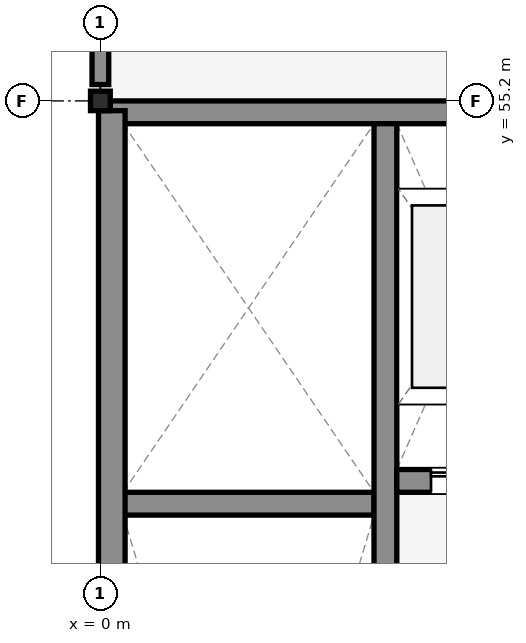
"""IFC4 building model, lengths in metres.
Left out: names, types, materials, properties, quantities, classifications, styles, units other than length and angle.
Written with IfcOpenShell. Run it as: python <this file> out.ifc"""

import sys

from ifc_helpers import new_model, si_unit, direction, frame, frame_2d, origin, origin_2d, place, context, subcontext, project, spatial, rectangle, i_section, extrude, element, fill, save


model = new_model("IFC4")
c1 = context("Model", 3, precision=1e-05, world=origin(), true_north=direction((0.0, 1.0)))
c2 = subcontext(c1, "Body", "Model", "MODEL_VIEW")
j1 = project(units=[si_unit("LENGTHUNIT", "METRE"), si_unit("PLANEANGLEUNIT", "RADIAN")], contexts=[c1])
p1 = place(None, origin())
s1 = spatial("IfcSite", under=j1, at=p1, CompositionType="ELEMENT")
p2 = place(p1, origin())
s2 = spatial("IfcBuilding", under=s1, at=p2, CompositionType="ELEMENT")
p3 = place(p2, frame((0.0, 0.0, 23.4)))
s3 = spatial("IfcBuildingStorey", under=s2, at=p3, CompositionType="ELEMENT", Elevation=23.4)
p4 = place(p3, frame((0.0, 55.2, 0.0), z_axis=(0.0, 0.0, 1.0), x_axis=(1.0, 0.0, 0.0)))
e1 = element("IfcColumn", 1, at=p4, inside=s3, PredefinedType="COLUMN", context=c2, shape_type="SweptSolid", body=[
    extrude(i_section(OverallWidth=0.256, OverallDepth=0.26, WebThickness=0.01, FlangeThickness=0.017, FilletRadius=0.013, at=origin_2d()), origin(), (0.0, 0.0, 1.0), 5.4),
])
p5 = place(p3, frame((0.0, 55.415, 0.0), z_axis=(0.0, 0.0, 1.0), x_axis=(0.0, 1.0, 0.0)))
e2 = element("IfcWall", 2, at=p5, inside=s3, PredefinedType="PARAPET", context=c2, shape_type="SweptSolid", body=[
    extrude(rectangle(XDim=24.87, YDim=0.22, at=frame_2d((12.435, 0.0))), origin(), (0.0, 0.0, 1.0), 1.15),
])
p6 = place(p3, frame((0.126, 55.05, 0.0), z_axis=(0.0, 0.0, 1.0), x_axis=(1.0, 0.0, 0.0)))
e3 = element("IfcWall", 3, at=p6, inside=s3, PredefinedType="SHEAR", context=c2, shape_type="SweptSolid", body=[
    extrude(rectangle(XDim=8.148, YDim=0.3, at=frame_2d((4.074, 0.0))), origin(), (0.0, 0.0, 1.0), 5.17),
])
p7 = place(p3, frame((0.3, 49.9, 0.0), z_axis=(0.0, 0.0, 1.0), x_axis=(1.0, 0.0, 0.0)))
e4 = element("IfcWall", 4, at=p7, inside=s3, PredefinedType="SHEAR", context=c2, shape_type="SweptSolid", body=[
    extrude(rectangle(XDim=3.3, YDim=0.3, at=frame_2d((1.65, 0.0))), origin(), (0.0, 0.0, 1.0), 5.17),
])
p8 = place(p3, frame((0.15, 38.528, 0.0), z_axis=(0.0, 0.0, 1.0), x_axis=(0.0, 1.0, 0.0)))
e5 = element("IfcWall", 5, at=p8, inside=s3, PredefinedType="SHEAR", context=c2, shape_type="SweptSolid", body=[
    extrude(rectangle(XDim=16.544, YDim=0.35, at=frame_2d((8.272, 0.0))), origin(), (0.0, 0.0, 1.0), 5.17),
])
p9 = place(p3, frame((3.75, 38.7, 0.0), z_axis=(0.0, 0.0, 1.0), x_axis=(0.0, 1.0, 0.0)))
e6 = element("IfcWall", 6, at=p9, inside=s3, PredefinedType="SHEAR", context=c2, shape_type="SweptSolid", body=[
    extrude(rectangle(XDim=16.2, YDim=0.3, at=frame_2d((8.1, 0.0))), origin(), (0.0, 0.0, 1.0), 5.17),
])
p10 = place(p9, frame((0.5, 0.0, 0.0)))
e7 = element("IfcOpeningElement", 7, at=p10, cuts=e6, PredefinedType="OPENING", context=c2, shape_type="SweptSolid", body=[
    extrude(rectangle(XDim=1.15, YDim=2.15, at=frame_2d((0.575, 1.075))), frame((0.0, 0.16, 0.0), z_axis=(0.0, -1.0, 0.0), x_axis=(1.0, 0.0, 0.0)), (0.0, 0.0, 1.0), 0.32),
])
p11 = place(p3, frame((3.9, 50.2, 0.0), z_axis=(0.0, 0.0, 1.0), x_axis=(1.0, 0.0, 0.0)))
e8 = element("IfcWall", 8, at=p11, inside=s3, PredefinedType="SHEAR", context=c2, shape_type="SweptSolid", body=[
    extrude(rectangle(XDim=4.2, YDim=0.3, at=frame_2d((2.1, 0.0))), origin(), (0.0, 0.0, 1.0), 5.17),
])
p12 = place(p11, frame((0.45, 0.0, 0.0)))
e9 = element("IfcOpeningElement", 9, at=p12, cuts=e8, PredefinedType="OPENING", context=c2, shape_type="SweptSolid", body=[
    extrude(rectangle(XDim=1.1, YDim=2.2, at=frame_2d((0.55, 1.1))), frame((0.0, 0.16, 0.0), z_axis=(0.0, -1.0, 0.0), x_axis=(1.0, 0.0, 0.0)), (0.0, 0.0, 1.0), 0.32),
])
p13 = place(p11, frame((2.65, 0.0, 0.0)))
e10 = element("IfcOpeningElement", 10, at=p13, cuts=e8, PredefinedType="OPENING", context=c2, shape_type="SweptSolid", body=[
    extrude(rectangle(XDim=1.1, YDim=2.2, at=frame_2d((0.55, 1.1))), frame((0.0, 0.16, 0.0), z_axis=(0.0, -1.0, 0.0), x_axis=(1.0, 0.0, 0.0)), (0.0, 0.0, 1.0), 0.32),
])
p14 = place(p12, origin())
e11 = element("IfcDoor", 11, at=p14, inside=s3, OperationType="SLIDING_TO_LEFT", PredefinedType="DOOR", context=c2, shape_type="SweptSolid", body=[
    extrude(rectangle(XDim=1.1, YDim=2.2, at=frame_2d((0.55, 1.1))), frame((0.0, 0.025, 0.0), z_axis=(0.0, -1.0, 0.0), x_axis=(1.0, 0.0, 0.0)), (0.0, 0.0, 1.0), 0.05),
])
fill(e9, e11)
save(model, sys.argv[1])
